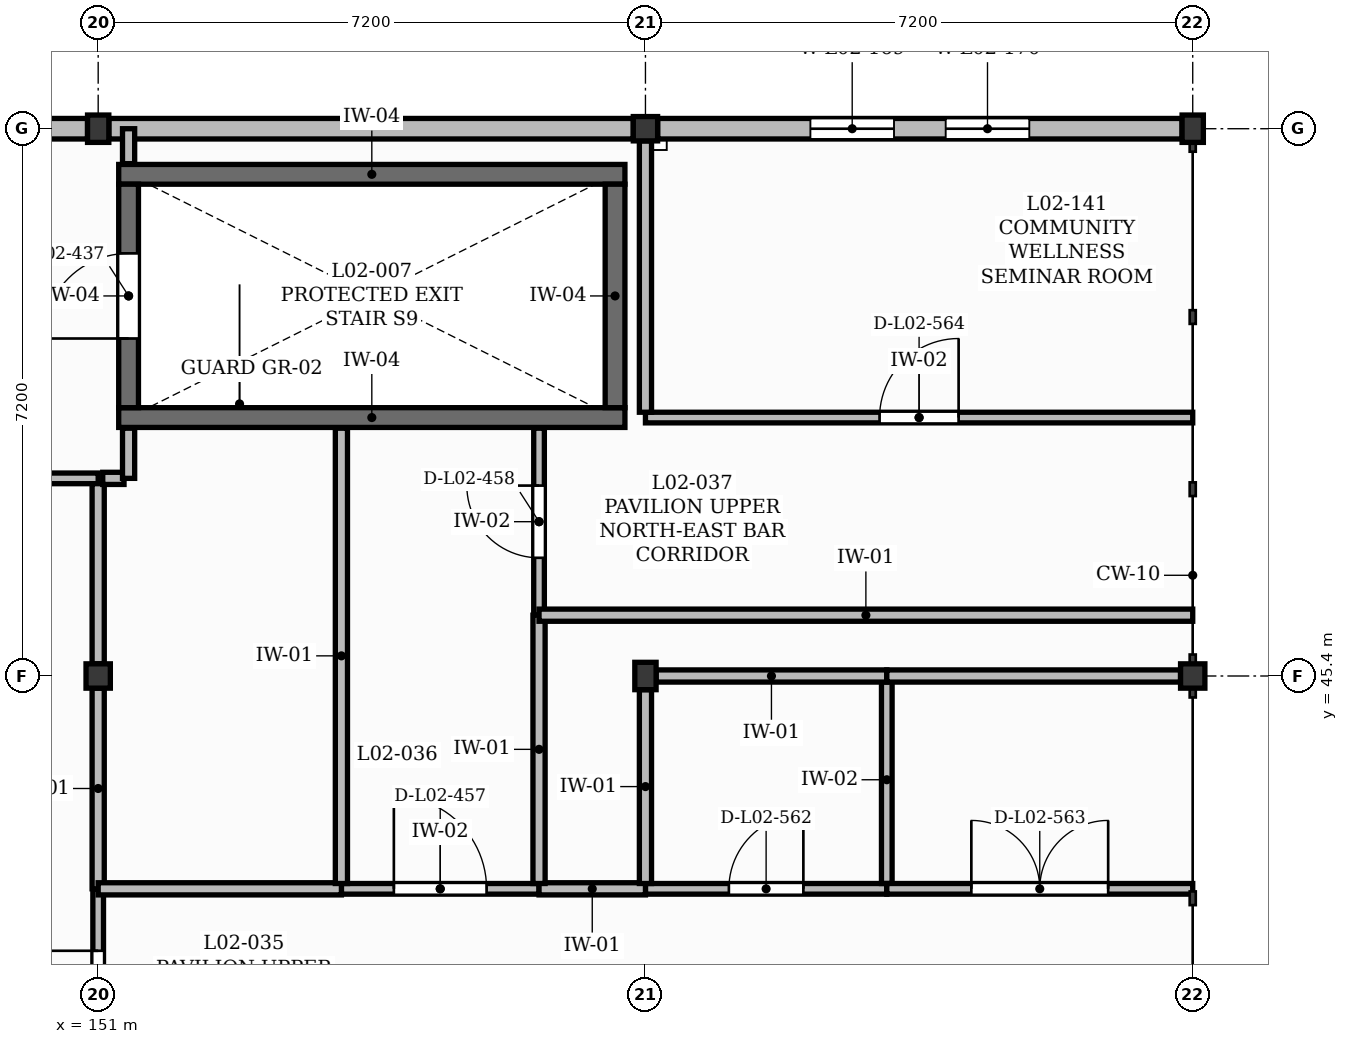
"""IFC4 building model, lengths in metres.
Left out: names, types, materials, properties, quantities, classifications, styles, units other than length and angle.
Written with IfcOpenShell. Run it as: python <this file> out.ifc"""

import sys

from ifc_helpers import new_model, si_unit, direction, frame, frame_2d, origin, origin_2d, place, context, subcontext, project, spatial, rectangle, extrude, element, fill, save


model = new_model("IFC4")
c1 = context("Model", 3, precision=1e-05, world=origin(), true_north=direction((0.0, 1.0)))
c2 = subcontext(c1, "Body", "Model", "MODEL_VIEW")
j1 = project(units=[si_unit("LENGTHUNIT", "METRE"), si_unit("PLANEANGLEUNIT", "RADIAN")], contexts=[c1])
p1 = place(None, origin())
s1 = spatial("IfcSite", under=j1, at=p1, CompositionType="ELEMENT")
p2 = place(p1, origin())
s2 = spatial("IfcBuilding", under=s1, at=p2, CompositionType="ELEMENT")
p3 = place(p2, frame((0.0, 0.0, 9.0)))
s3 = spatial("IfcBuildingStorey", under=s2, at=p3, CompositionType="ELEMENT", Elevation=9.0)
p4 = place(p3, frame((151.0, 45.4, 0.0), z_axis=(0.0, 0.0, 1.0), x_axis=(1.0, 0.0, 0.0)))
e1 = element("IfcColumn", 1, at=p4, inside=s3, PredefinedType="COLUMN", context=c2, shape_type="SweptSolid", body=[
    extrude(rectangle(XDim=0.32, YDim=0.32, at=origin_2d()), origin(), (0.0, 0.0, 1.0), 5.775),
])
p5 = place(p3, frame((151.0, 52.6, 0.0), z_axis=(0.0, 0.0, 1.0), x_axis=(1.0, 0.0, 0.0)))
e2 = element("IfcColumn", 2, at=p5, inside=s3, PredefinedType="COLUMN", context=c2, shape_type="SweptSolid", body=[
    extrude(rectangle(XDim=0.28, YDim=0.36, at=origin_2d()), origin(), (0.0, 0.0, 1.0), 5.775),
])
p6 = place(p3, frame((158.2, 45.4, 0.0), z_axis=(0.0, 0.0, 1.0), x_axis=(1.0, 0.0, 0.0)))
e3 = element("IfcColumn", 3, at=p6, inside=s3, PredefinedType="COLUMN", context=c2, shape_type="SweptSolid", body=[
    extrude(rectangle(XDim=0.28, YDim=0.36, at=origin_2d()), origin(), (0.0, 0.0, 1.0), 7.57),
])
p7 = place(p3, frame((158.2, 52.6, 0.0), z_axis=(0.0, 0.0, 1.0), x_axis=(1.0, 0.0, 0.0)))
e4 = element("IfcColumn", 4, at=p7, inside=s3, PredefinedType="COLUMN", context=c2, shape_type="SweptSolid", body=[
    extrude(rectangle(XDim=0.32, YDim=0.32, at=origin_2d()), origin(), (0.0, 0.0, 1.0), 7.57),
])
p8 = place(p3, frame((165.4, 45.4, 0.0), z_axis=(0.0, 0.0, 1.0), x_axis=(1.0, 0.0, 0.0)))
e5 = element("IfcColumn", 5, at=p8, inside=s3, PredefinedType="COLUMN", context=c2, shape_type="SweptSolid", body=[
    extrude(rectangle(XDim=0.32, YDim=0.32, at=origin_2d()), origin(), (0.0, 0.0, 1.0), 9.365),
])
p9 = place(p3, frame((165.4, 52.6, 0.0), z_axis=(0.0, 0.0, 1.0), x_axis=(1.0, 0.0, 0.0)))
e6 = element("IfcColumn", 6, at=p9, inside=s3, PredefinedType="COLUMN", context=c2, shape_type="SweptSolid", body=[
    extrude(rectangle(XDim=0.28, YDim=0.36, at=origin_2d()), origin(), (0.0, 0.0, 1.0), 9.365),
])
p10 = place(p3, frame((143.96, 52.6, 0.0), z_axis=(0.0, 0.0, 1.0), x_axis=(1.0, 0.0, 0.0)))
e7 = element("IfcWall", 7, at=p10, inside=s3, PredefinedType="SOLIDWALL", context=c2, shape_type="SweptSolid", body=[
    extrude(rectangle(XDim=6.9, YDim=0.27, at=frame_2d((3.45, 0.0))), origin(), (0.0, 0.0, 1.0), 3.54),
])
p11 = place(p10, frame((1.21, 0.0, 1.0)))
e8 = element("IfcOpeningElement", 8, at=p11, cuts=e7, PredefinedType="OPENING", context=c2, shape_type="SweptSolid", body=[
    extrude(rectangle(XDim=1.34, YDim=1.95, at=frame_2d((0.67, 0.975))), frame((0.0, 0.145, 0.0), z_axis=(0.0, -1.0, 0.0), x_axis=(1.0, 0.0, 0.0)), (0.0, 0.0, 1.0), 0.29),
])
p12 = place(p10, frame((4.47, 0.0, 1.0)))
e9 = element("IfcOpeningElement", 9, at=p12, cuts=e7, PredefinedType="OPENING", context=c2, shape_type="SweptSolid", body=[
    extrude(rectangle(XDim=1.48, YDim=1.95, at=frame_2d((0.74, 0.975))), frame((0.0, 0.145, 0.0), z_axis=(0.0, -1.0, 0.0), x_axis=(1.0, 0.0, 0.0)), (0.0, 0.0, 1.0), 0.29),
])
p13 = place(p3, frame((151.14, 52.6, 0.0), z_axis=(0.0, 0.0, 1.0), x_axis=(1.0, 0.0, 0.0)))
e10 = element("IfcWall", 10, at=p13, inside=s3, PredefinedType="SOLIDWALL", context=c2, shape_type="SweptSolid", body=[
    extrude(rectangle(XDim=6.9, YDim=0.27, at=frame_2d((3.45, 0.0))), origin(), (0.0, 0.0, 1.0), 3.54),
])
p14 = place(p3, frame((158.36, 52.6, 0.0), z_axis=(0.0, 0.0, 1.0), x_axis=(1.0, 0.0, 0.0)))
e11 = element("IfcWall", 11, at=p14, inside=s3, PredefinedType="SOLIDWALL", context=c2, shape_type="SweptSolid", body=[
    extrude(rectangle(XDim=6.9, YDim=0.27, at=frame_2d((3.45, 0.0))), origin(), (0.0, 0.0, 1.0), 3.54),
])
p15 = place(p14, frame((2.01, 0.0, 1.0)))
e12 = element("IfcOpeningElement", 12, at=p15, cuts=e11, PredefinedType="OPENING", context=c2, shape_type="SweptSolid", body=[
    extrude(rectangle(XDim=1.1, YDim=1.8, at=frame_2d((0.55, 0.9))), frame((0.0, 0.145, 0.0), z_axis=(0.0, -1.0, 0.0), x_axis=(1.0, 0.0, 0.0)), (0.0, 0.0, 1.0), 0.29),
])
p16 = place(p14, frame((3.79, 0.0, 1.0)))
e13 = element("IfcOpeningElement", 13, at=p16, cuts=e11, PredefinedType="OPENING", context=c2, shape_type="SweptSolid", body=[
    extrude(rectangle(XDim=1.1, YDim=1.8, at=frame_2d((0.55, 0.9))), frame((0.0, 0.145, 0.0), z_axis=(0.0, -1.0, 0.0), x_axis=(1.0, 0.0, 0.0)), (0.0, 0.0, 1.0), 0.29),
])
for number, where, z_axis, x_axis in (
    (14, (151.27, 48.8, 0.0), (0.0, 0.0, 1.0), (1.0, 0.0, 0.0)),
    (15, (151.27, 52.0, 0.0), (0.0, 0.0, 1.0), (1.0, 0.0, 0.0)),
):
    element("IfcWall", number, at=place(p3, frame(where, z_axis=z_axis, x_axis=x_axis)), inside=s3, PredefinedType="SHEAR", context=c2, shape_type="SweptSolid", body=[
        extrude(rectangle(XDim=6.66, YDim=0.26, at=frame_2d((3.33, 0.0))), origin(), (0.0, 0.0, 1.0), 3.95),
    ])
p17 = place(p3, frame((151.4, 48.93, 0.0), z_axis=(0.0, 0.0, 1.0), x_axis=(0.0, 1.0, 0.0)))
e16 = element("IfcWall", 16, at=p17, inside=s3, PredefinedType="SHEAR", context=c2, shape_type="SweptSolid", body=[
    extrude(rectangle(XDim=2.94, YDim=0.26, at=frame_2d((1.47, 0.0))), origin(), (0.0, 0.0, 1.0), 3.95),
])
p18 = place(p17, frame((0.91, 0.0, 0.0)))
e17 = element("IfcOpeningElement", 17, at=p18, cuts=e16, PredefinedType="OPENING", context=c2, shape_type="SweptSolid", body=[
    extrude(rectangle(XDim=1.12, YDim=2.1, at=frame_2d((0.56, 1.05))), frame((0.0, 0.14, 0.0), z_axis=(0.0, -1.0, 0.0), x_axis=(1.0, 0.0, 0.0)), (0.0, 0.0, 1.0), 0.28),
])
p19 = place(p3, frame((157.8, 48.93, 0.0), z_axis=(0.0, 0.0, 1.0), x_axis=(0.0, 1.0, 0.0)))
e18 = element("IfcWall", 18, at=p19, inside=s3, PredefinedType="SHEAR", context=c2, shape_type="SweptSolid", body=[
    extrude(rectangle(XDim=2.94, YDim=0.26, at=frame_2d((1.47, 0.0))), origin(), (0.0, 0.0, 1.0), 3.95),
])
p20 = place(p3, frame((147.6, 48.0, 0.0), z_axis=(0.0, 0.0, 1.0), x_axis=(1.0, 0.0, 0.0)))
e19 = element("IfcWall", 19, at=p20, inside=s3, PredefinedType="PARTITIONING", context=c2, shape_type="SweptSolid", body=[
    extrude(rectangle(XDim=3.4, YDim=0.14, at=frame_2d((1.7, 0.0))), origin(), (0.0, 0.0, 1.0), 3.78),
])
p21 = place(p20, frame((1.09, 0.0, 0.0)))
e20 = element("IfcOpeningElement", 20, at=p21, cuts=e19, PredefinedType="OPENING", context=c2, shape_type="SweptSolid", body=[
    extrude(rectangle(XDim=1.22, YDim=2.1, at=frame_2d((0.61, 1.05))), frame((0.0, 0.08, 0.0), z_axis=(0.0, -1.0, 0.0), x_axis=(1.0, 0.0, 0.0)), (0.0, 0.0, 1.0), 0.16),
])
p22 = place(p3, frame((151.0, 40.07, 0.0), z_axis=(0.0, 0.0, 1.0), x_axis=(0.0, 1.0, 0.0)))
e21 = element("IfcWall", 21, at=p22, inside=s3, PredefinedType="PARTITIONING", context=c2, shape_type="SweptSolid", body=[
    extrude(rectangle(XDim=2.53, YDim=0.14, at=frame_2d((1.265, 0.0))), origin(), (0.0, 0.0, 1.0), 3.78),
])
p23 = place(p22, frame((0.815, 0.0, 0.0)))
e22 = element("IfcOpeningElement", 22, at=p23, cuts=e21, PredefinedType="OPENING", context=c2, shape_type="SweptSolid", body=[
    extrude(rectangle(XDim=0.9, YDim=2.1, at=frame_2d((0.45, 1.05))), frame((0.0, 0.08, 0.0), z_axis=(0.0, -1.0, 0.0), x_axis=(1.0, 0.0, 0.0)), (0.0, 0.0, 1.0), 0.16),
])
p24 = place(p3, frame((154.2, 42.6, 0.0), z_axis=(0.0, 0.0, 1.0), x_axis=(1.0, 0.0, 0.0)))
e23 = element("IfcWall", 23, at=p24, inside=s3, PredefinedType="PARTITIONING", context=c2, shape_type="SweptSolid", body=[
    extrude(rectangle(XDim=2.6, YDim=0.14, at=frame_2d((1.3, 0.0))), origin(), (0.0, 0.0, 1.0), 3.78),
])
p25 = place(p24, frame((0.69, 0.0, 0.0)))
e24 = element("IfcOpeningElement", 24, at=p25, cuts=e23, PredefinedType="OPENING", context=c2, shape_type="SweptSolid", body=[
    extrude(rectangle(XDim=1.22, YDim=2.1, at=frame_2d((0.61, 1.05))), frame((0.0, 0.08, 0.0), z_axis=(0.0, -1.0, 0.0), x_axis=(1.0, 0.0, 0.0)), (0.0, 0.0, 1.0), 0.16),
])
p26 = place(p3, frame((156.8, 46.2, 0.0), z_axis=(0.0, 0.0, 1.0), x_axis=(0.0, 1.0, 0.0)))
e25 = element("IfcWall", 25, at=p26, inside=s3, PredefinedType="PARTITIONING", context=c2, shape_type="SweptSolid", body=[
    extrude(rectangle(XDim=2.46, YDim=0.14, at=frame_2d((1.23, 0.0))), origin(), (0.0, 0.0, 1.0), 3.78),
])
p27 = place(p26, frame((0.755, 0.0, 0.0)))
e26 = element("IfcOpeningElement", 26, at=p27, cuts=e25, PredefinedType="OPENING", context=c2, shape_type="SweptSolid", body=[
    extrude(rectangle(XDim=0.95, YDim=2.1, at=frame_2d((0.475, 1.05))), frame((0.0, 0.08, 0.0), z_axis=(0.0, -1.0, 0.0), x_axis=(1.0, 0.0, 0.0)), (0.0, 0.0, 1.0), 0.16),
])
p28 = place(p3, frame((158.2, 42.6, 0.0), z_axis=(0.0, 0.0, 1.0), x_axis=(1.0, 0.0, 0.0)))
e27 = element("IfcWall", 27, at=p28, inside=s3, PredefinedType="PARTITIONING", context=c2, shape_type="SweptSolid", body=[
    extrude(rectangle(XDim=3.175, YDim=0.14, at=frame_2d((1.587, 0.0))), origin(), (0.0, 0.0, 1.0), 3.78),
])
p29 = place(p28, frame((1.097, 0.0, 0.0)))
e28 = element("IfcOpeningElement", 28, at=p29, cuts=e27, PredefinedType="OPENING", context=c2, shape_type="SweptSolid", body=[
    extrude(rectangle(XDim=0.98, YDim=2.15, at=frame_2d((0.49, 1.075))), frame((0.0, 0.08, 0.0), z_axis=(0.0, -1.0, 0.0), x_axis=(1.0, 0.0, 0.0)), (0.0, 0.0, 1.0), 0.16),
])
p30 = place(p3, frame((158.2, 48.8, 0.0), z_axis=(0.0, 0.0, 1.0), x_axis=(1.0, 0.0, 0.0)))
e29 = element("IfcWall", 29, at=p30, inside=s3, PredefinedType="PARTITIONING", context=c2, shape_type="SweptSolid", body=[
    extrude(rectangle(XDim=7.2, YDim=0.14, at=frame_2d((3.6, 0.0))), origin(), (0.0, 0.0, 1.0), 3.78),
])
p31 = place(p30, frame((3.08, 0.0, 0.0)))
e30 = element("IfcOpeningElement", 30, at=p31, cuts=e29, PredefinedType="OPENING", context=c2, shape_type="SweptSolid", body=[
    extrude(rectangle(XDim=1.04, YDim=2.1, at=frame_2d((0.52, 1.05))), frame((0.0, 0.08, 0.0), z_axis=(0.0, -1.0, 0.0), x_axis=(1.0, 0.0, 0.0)), (0.0, 0.0, 1.0), 0.16),
])
p32 = place(p3, frame((161.375, 42.67, 0.0), z_axis=(0.0, 0.0, 1.0), x_axis=(0.0, 1.0, 0.0)))
e31 = element("IfcWall", 31, at=p32, inside=s3, PredefinedType="PARTITIONING", context=c2, shape_type="SweptSolid", body=[
    extrude(rectangle(XDim=2.73, YDim=0.14, at=frame_2d((1.365, 0.0))), origin(), (0.0, 0.0, 1.0), 3.78),
])
p33 = place(p3, frame((161.375, 42.6, 0.0), z_axis=(0.0, 0.0, 1.0), x_axis=(1.0, 0.0, 0.0)))
e32 = element("IfcWall", 32, at=p33, inside=s3, PredefinedType="PARTITIONING", context=c2, shape_type="SweptSolid", body=[
    extrude(rectangle(XDim=4.025, YDim=0.14, at=frame_2d((2.012, 0.0))), origin(), (0.0, 0.0, 1.0), 3.78),
])
p34 = place(p33, frame((1.113, 0.0, 0.0)))
e33 = element("IfcOpeningElement", 33, at=p34, cuts=e32, PredefinedType="OPENING", context=c2, shape_type="SweptSolid", body=[
    extrude(rectangle(XDim=1.8, YDim=2.3, at=frame_2d((0.9, 1.15))), frame((0.0, 0.08, 0.0), z_axis=(0.0, -1.0, 0.0), x_axis=(1.0, 0.0, 0.0)), (0.0, 0.0, 1.0), 0.16),
])
p35 = place(p3, frame((151.0, 42.6, 0.0), z_axis=(0.0, 0.0, 1.0), x_axis=(0.0, 1.0, 0.0)))
e34 = element("IfcWall", 34, at=p35, inside=s3, PredefinedType="PARTITIONING", context=c2, shape_type="SweptSolid", body=[
    extrude(rectangle(XDim=2.64, YDim=0.16, at=frame_2d((1.32, 0.0))), origin(), (0.0, 0.0, 1.0), 3.78),
])
p36 = place(p3, frame((151.0, 45.56, 0.0), z_axis=(0.0, 0.0, 1.0), x_axis=(0.0, 1.0, 0.0)))
e35 = element("IfcWall", 35, at=p36, inside=s3, PredefinedType="PARTITIONING", context=c2, shape_type="SweptSolid", body=[
    extrude(rectangle(XDim=2.37, YDim=0.16, at=frame_2d((1.185, 0.0))), origin(), (0.0, 0.0, 1.0), 3.78),
])
p37 = place(p3, frame((151.06, 48.0, 0.0), z_axis=(0.0, 0.0, 1.0), x_axis=(1.0, 0.0, 0.0)))
e36 = element("IfcWall", 36, at=p37, inside=s3, PredefinedType="PARTITIONING", context=c2, shape_type="SweptSolid", body=[
    extrude(rectangle(XDim=0.28, YDim=0.16, at=frame_2d((0.14, 0.0))), origin(), (0.0, 0.0, 1.0), 3.78),
])
p38 = place(p3, frame((151.4, 48.0, 0.0), z_axis=(0.0, 0.0, 1.0), x_axis=(0.0, 1.0, 0.0)))
e37 = element("IfcWall", 37, at=p38, inside=s3, PredefinedType="PARTITIONING", context=c2, shape_type="SweptSolid", body=[
    extrude(rectangle(XDim=0.66, YDim=0.16, at=frame_2d((0.33, 0.0))), origin(), (0.0, 0.0, 1.0), 3.78),
])
p39 = place(p3, frame((151.4, 52.14, 0.0), z_axis=(0.0, 0.0, 1.0), x_axis=(0.0, 1.0, 0.0)))
e38 = element("IfcWall", 38, at=p39, inside=s3, PredefinedType="PARTITIONING", context=c2, shape_type="SweptSolid", body=[
    extrude(rectangle(XDim=0.46, YDim=0.16, at=frame_2d((0.23, 0.0))), origin(), (0.0, 0.0, 1.0), 3.78),
])
p40 = place(p3, frame((158.2, 42.6, 0.0), z_axis=(0.0, 0.0, 1.0), x_axis=(-1.0, 0.0, 0.0)))
e39 = element("IfcWall", 39, at=p40, inside=s3, PredefinedType="PARTITIONING", context=c2, shape_type="SweptSolid", body=[
    extrude(rectangle(XDim=1.4, YDim=0.16, at=frame_2d((0.7, 0.0))), origin(), (0.0, 0.0, 1.0), 3.78),
])
p41 = place(p3, frame((154.2, 42.6, 0.0), z_axis=(0.0, 0.0, 1.0), x_axis=(-1.0, 0.0, 0.0)))
e40 = element("IfcWall", 40, at=p41, inside=s3, PredefinedType="PARTITIONING", context=c2, shape_type="SweptSolid", body=[
    extrude(rectangle(XDim=3.2, YDim=0.16, at=frame_2d((1.6, 0.0))), origin(), (0.0, 0.0, 1.0), 3.78),
])
p42 = place(p3, frame((156.8, 42.67, 0.0), z_axis=(0.0, 0.0, 1.0), x_axis=(0.0, 1.0, 0.0)))
e41 = element("IfcWall", 41, at=p42, inside=s3, PredefinedType="PARTITIONING", context=c2, shape_type="SweptSolid", body=[
    extrude(rectangle(XDim=3.53, YDim=0.16, at=frame_2d((1.765, 0.0))), origin(), (0.0, 0.0, 1.0), 3.78),
])
p43 = place(p3, frame((154.2, 42.67, 0.0), z_axis=(0.0, 0.0, 1.0), x_axis=(0.0, 1.0, 0.0)))
e42 = element("IfcWall", 42, at=p43, inside=s3, PredefinedType="PARTITIONING", context=c2, shape_type="SweptSolid", body=[
    extrude(rectangle(XDim=5.99, YDim=0.16, at=frame_2d((2.995, 0.0))), origin(), (0.0, 0.0, 1.0), 3.78),
])
p44 = place(p3, frame((156.8, 46.2, 0.0), z_axis=(0.0, 0.0, 1.0), x_axis=(1.0, 0.0, 0.0)))
e43 = element("IfcWall", 43, at=p44, inside=s3, PredefinedType="PARTITIONING", context=c2, shape_type="SweptSolid", body=[
    extrude(rectangle(XDim=8.6, YDim=0.16, at=frame_2d((4.3, 0.0))), origin(), (0.0, 0.0, 1.0), 3.78),
])
p45 = place(p3, frame((161.375, 45.4, 0.0), z_axis=(0.0, 0.0, 1.0), x_axis=(-1.0, 0.0, 0.0)))
e44 = element("IfcWall", 44, at=p45, inside=s3, PredefinedType="PARTITIONING", context=c2, shape_type="SweptSolid", body=[
    extrude(rectangle(XDim=3.035, YDim=0.16, at=frame_2d((1.518, 0.0))), origin(), (0.0, 0.0, 1.0), 3.78),
])
p46 = place(p3, frame((158.2, 42.67, 0.0), z_axis=(0.0, 0.0, 1.0), x_axis=(0.0, 1.0, 0.0)))
e45 = element("IfcWall", 45, at=p46, inside=s3, PredefinedType="PARTITIONING", context=c2, shape_type="SweptSolid", body=[
    extrude(rectangle(XDim=2.55, YDim=0.16, at=frame_2d((1.275, 0.0))), origin(), (0.0, 0.0, 1.0), 3.78),
])
p47 = place(p3, frame((165.24, 45.4, 0.0), z_axis=(0.0, 0.0, 1.0), x_axis=(-1.0, 0.0, 0.0)))
e46 = element("IfcWall", 46, at=p47, inside=s3, PredefinedType="PARTITIONING", context=c2, shape_type="SweptSolid", body=[
    extrude(rectangle(XDim=3.865, YDim=0.16, at=frame_2d((1.932, 0.0))), origin(), (0.0, 0.0, 1.0), 3.78),
])
p48 = place(p3, frame((158.2, 48.87, 0.0), z_axis=(0.0, 0.0, 1.0), x_axis=(0.0, 1.0, 0.0)))
e47 = element("IfcWall", 47, at=p48, inside=s3, PredefinedType="PARTITIONING", context=c2, shape_type="SweptSolid", body=[
    extrude(rectangle(XDim=3.57, YDim=0.16, at=frame_2d((1.785, 0.0))), origin(), (0.0, 0.0, 1.0), 3.78),
])
p49 = place(p15, origin())
e48 = element("IfcWindow", 48, at=p49, inside=s3, PartitioningType="SINGLE_PANEL", PredefinedType="WINDOW", context=c2, shape_type="SweptSolid", body=[
    extrude(rectangle(XDim=1.1, YDim=1.8, at=frame_2d((0.55, 0.9))), frame((0.0, 0.03, 0.0), z_axis=(0.0, -1.0, 0.0), x_axis=(1.0, 0.0, 0.0)), (0.0, 0.0, 1.0), 0.06),
])
fill(e12, e48)
p50 = place(p16, origin())
e49 = element("IfcWindow", 49, at=p50, inside=s3, PartitioningType="SINGLE_PANEL", PredefinedType="WINDOW", context=c2, shape_type="SweptSolid", body=[
    extrude(rectangle(XDim=1.1, YDim=1.8, at=frame_2d((0.55, 0.9))), frame((0.0, 0.03, 0.0), z_axis=(0.0, -1.0, 0.0), x_axis=(1.0, 0.0, 0.0)), (0.0, 0.0, 1.0), 0.06),
])
fill(e13, e49)
p51 = place(p18, origin())
e50 = element("IfcDoor", 50, at=p51, inside=s3, OperationType="SINGLE_SWING_LEFT", PredefinedType="DOOR", context=c2, shape_type="SweptSolid", body=[
    extrude(rectangle(XDim=1.12, YDim=2.1, at=frame_2d((0.56, 1.05))), frame((0.0, 0.025, 0.0), z_axis=(0.0, -1.0, 0.0), x_axis=(1.0, 0.0, 0.0)), (0.0, 0.0, 1.0), 0.05),
])
fill(e17, e50)
p52 = place(p23, origin())
e51 = element("IfcDoor", 51, at=p52, inside=s3, OperationType="SINGLE_SWING_RIGHT", PredefinedType="DOOR", context=c2, shape_type="SweptSolid", body=[
    extrude(rectangle(XDim=0.9, YDim=2.1, at=frame_2d((0.45, 1.05))), frame((0.0, 0.025, 0.0), z_axis=(0.0, -1.0, 0.0), x_axis=(1.0, 0.0, 0.0)), (0.0, 0.0, 1.0), 0.05),
])
fill(e22, e51)
p53 = place(p25, origin())
e52 = element("IfcDoor", 52, at=p53, inside=s3, OperationType="SINGLE_SWING_LEFT", PredefinedType="DOOR", context=c2, shape_type="SweptSolid", body=[
    extrude(rectangle(XDim=1.22, YDim=2.1, at=frame_2d((0.61, 1.05))), frame((0.0, 0.025, 0.0), z_axis=(0.0, -1.0, 0.0), x_axis=(1.0, 0.0, 0.0)), (0.0, 0.0, 1.0), 0.05),
])
fill(e24, e52)
p54 = place(p27, origin())
e53 = element("IfcDoor", 53, at=p54, inside=s3, OperationType="SINGLE_SWING_RIGHT", PredefinedType="DOOR", context=c2, shape_type="SweptSolid", body=[
    extrude(rectangle(XDim=0.95, YDim=2.1, at=frame_2d((0.475, 1.05))), frame((0.0, 0.025, 0.0), z_axis=(0.0, -1.0, 0.0), x_axis=(1.0, 0.0, 0.0)), (0.0, 0.0, 1.0), 0.05),
])
fill(e26, e53)
p55 = place(p29, origin())
e54 = element("IfcDoor", 54, at=p55, inside=s3, OperationType="SINGLE_SWING_RIGHT", PredefinedType="DOOR", context=c2, shape_type="SweptSolid", body=[
    extrude(rectangle(XDim=0.98, YDim=2.15, at=frame_2d((0.49, 1.075))), frame((0.0, 0.025, 0.0), z_axis=(0.0, -1.0, 0.0), x_axis=(1.0, 0.0, 0.0)), (0.0, 0.0, 1.0), 0.05),
])
fill(e28, e54)
p56 = place(p34, origin())
e55 = element("IfcDoor", 55, at=p56, inside=s3, OperationType="DOUBLE_DOOR_SINGLE_SWING", PredefinedType="DOOR", context=c2, shape_type="SweptSolid", body=[
    extrude(rectangle(XDim=1.8, YDim=2.3, at=frame_2d((0.9, 1.15))), frame((0.0, 0.025, 0.0), z_axis=(0.0, -1.0, 0.0), x_axis=(1.0, 0.0, 0.0)), (0.0, 0.0, 1.0), 0.05),
])
fill(e33, e55)
p57 = place(p31, origin())
e56 = element("IfcDoor", 56, at=p57, inside=s3, OperationType="SINGLE_SWING_RIGHT", PredefinedType="DOOR", context=c2, shape_type="SweptSolid", body=[
    extrude(rectangle(XDim=1.04, YDim=2.1, at=frame_2d((0.52, 1.05))), frame((0.0, 0.025, 0.0), z_axis=(0.0, -1.0, 0.0), x_axis=(1.0, 0.0, 0.0)), (0.0, 0.0, 1.0), 0.05),
])
fill(e30, e56)
save(model, sys.argv[1])
